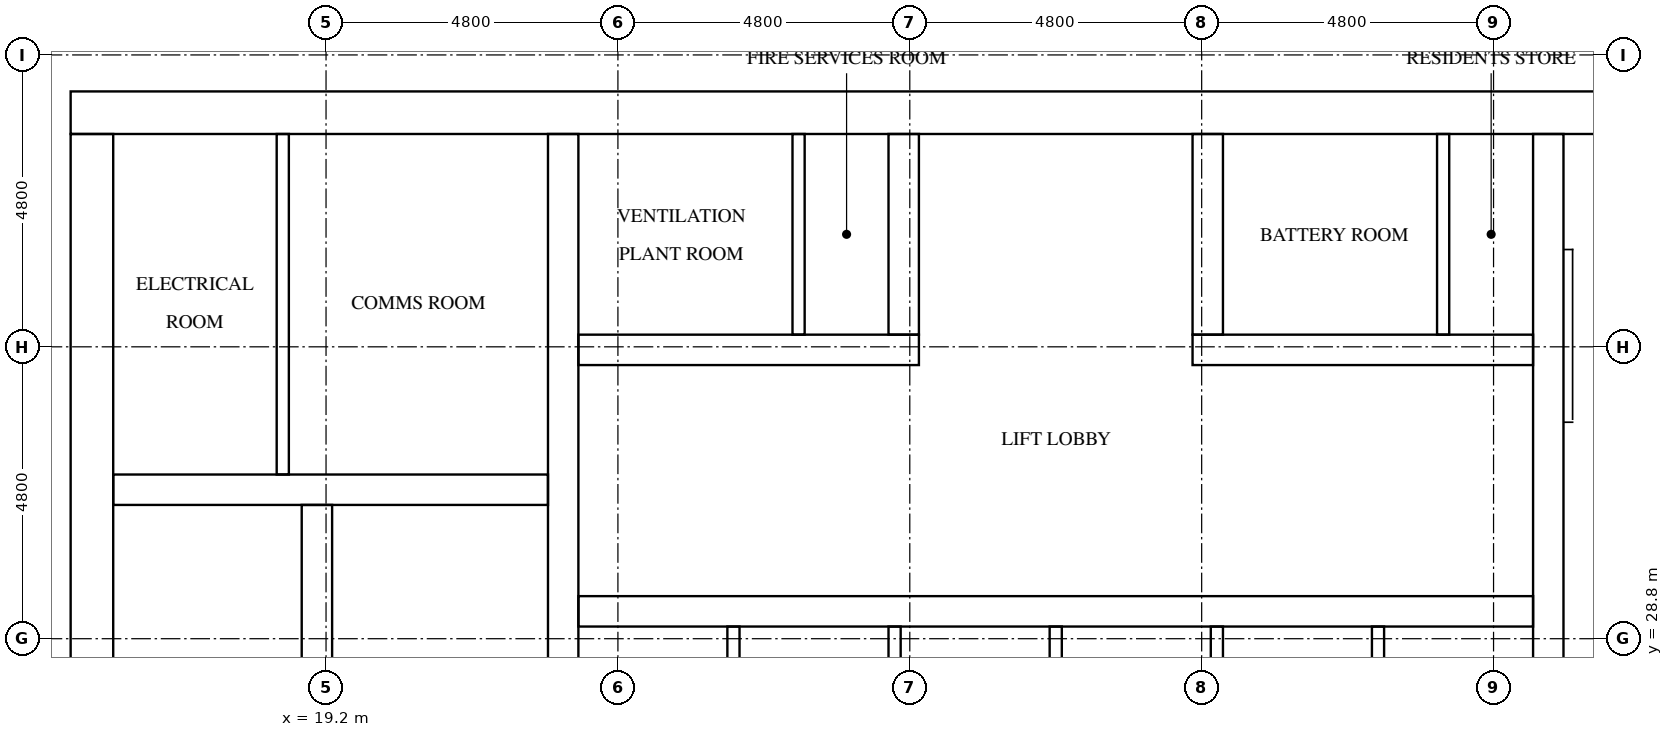
"""IFC4 building model, lengths in metres.
Left out: names, types, materials, properties, quantities, classifications, styles, units other than length and angle.
Written with IfcOpenShell. Run it as: python <this file> out.ifc"""

import sys

from ifc_helpers import new_model, si_unit, direction, frame, frame_2d, origin, place, context, subcontext, project, spatial, rectangle, extrude, element, fill, save


model = new_model("IFC4")
c1 = context("Model", 3, precision=1e-05, world=origin(), true_north=direction((0.0, 1.0)))
c2 = subcontext(c1, "Body", "Model", "MODEL_VIEW")
j1 = project(units=[si_unit("LENGTHUNIT", "METRE"), si_unit("PLANEANGLEUNIT", "RADIAN")], contexts=[c1])
p1 = place(None, origin())
s1 = spatial("IfcSite", under=j1, at=p1, CompositionType="ELEMENT")
p2 = place(p1, origin())
s2 = spatial("IfcBuilding", under=s1, at=p2, CompositionType="ELEMENT")
p3 = place(p2, frame((0.0, 0.0, 182.4)))
s3 = spatial("IfcBuildingStorey", under=s2, at=p3, CompositionType="ELEMENT", Elevation=182.4)
p4 = place(p3, frame((15.0, 37.45, 0.0), z_axis=(0.0, 0.0, 1.0), x_axis=(1.0, 0.0, 0.0)))
e1 = element("IfcWall", 1, at=p4, inside=s3, PredefinedType="SHEAR", context=c2, shape_type="SweptSolid", body=[
    extrude(rectangle(XDim=32.4, YDim=0.7, at=frame_2d((16.2, 0.0))), origin(), (0.0, 0.0, 1.0), 3.2),
])
p5 = place(p4, frame((15.3, 0.0, 0.0)))
e2 = element("IfcOpeningElement", 2, at=p5, cuts=e1, PredefinedType="OPENING", context=c2, shape_type="SweptSolid", body=[
    extrude(rectangle(XDim=1.8, YDim=2.1, at=frame_2d((0.9, 1.05))), frame((0.0, 0.36, 0.0), z_axis=(0.0, -1.0, 0.0), x_axis=(1.0, 0.0, 0.0)), (0.0, 0.0, 1.0), 0.72),
])
p6 = place(p4, frame((1.544, 0.0, 0.0)))
e3 = element("IfcOpeningElement", 3, at=p6, cuts=e1, PredefinedType="OPENING", context=c2, shape_type="SweptSolid", body=[
    extrude(rectangle(XDim=1.0, YDim=2.1, at=frame_2d((0.5, 1.05))), frame((0.0, 0.36, 0.0), z_axis=(0.0, -1.0, 0.0), x_axis=(1.0, 0.0, 0.0)), (0.0, 0.0, 1.0), 0.72),
])
p7 = place(p4, frame((5.219, 0.0, 0.0)))
e4 = element("IfcOpeningElement", 4, at=p7, cuts=e1, PredefinedType="OPENING", context=c2, shape_type="SweptSolid", body=[
    extrude(rectangle(XDim=1.0, YDim=2.1, at=frame_2d((0.5, 1.05))), frame((0.0, 0.36, 0.0), z_axis=(0.0, -1.0, 0.0), x_axis=(1.0, 0.0, 0.0)), (0.0, 0.0, 1.0), 0.72),
])
p8 = place(p3, frame((15.35, 15.7, 0.0), z_axis=(0.0, 0.0, 1.0), x_axis=(0.0, 1.0, 0.0)))
e5 = element("IfcWall", 5, at=p8, inside=s3, PredefinedType="SHEAR", context=c2, shape_type="SweptSolid", body=[
    extrude(rectangle(XDim=21.4, YDim=0.7, at=frame_2d((10.7, 0.0))), origin(), (0.0, 0.0, 1.0), 3.2),
])
p9 = place(p8, frame((5.06, 0.0, 0.0)))
e6 = element("IfcOpeningElement", 6, at=p9, cuts=e5, PredefinedType="OPENING", context=c2, shape_type="SweptSolid", body=[
    extrude(rectangle(XDim=1.2, YDim=2.1, at=frame_2d((0.6, 1.05))), frame((0.0, 0.36, 0.0), z_axis=(0.0, -1.0, 0.0), x_axis=(1.0, 0.0, 0.0)), (0.0, 0.0, 1.0), 0.72),
])
p10 = place(p3, frame((19.05, 15.7, 0.0), z_axis=(0.0, 0.0, 1.0), x_axis=(0.0, 1.0, 0.0)))
e7 = element("IfcWall", 7, at=p10, inside=s3, PredefinedType="SHEAR", context=c2, shape_type="SweptSolid", body=[
    extrude(rectangle(XDim=15.3, YDim=0.5, at=frame_2d((7.65, 0.0))), origin(), (0.0, 0.0, 1.0), 3.2),
])
p11 = place(p10, frame((9.75, 0.0, 0.0)))
e8 = element("IfcOpeningElement", 8, at=p11, cuts=e7, PredefinedType="OPENING", context=c2, shape_type="SweptSolid", body=[
    extrude(rectangle(XDim=1.1, YDim=2.1, at=frame_2d((0.55, 1.05))), frame((0.0, 0.26, 0.0), z_axis=(0.0, -1.0, 0.0), x_axis=(1.0, 0.0, 0.0)), (0.0, 0.0, 1.0), 0.52),
])
p12 = place(p10, frame((13.25, 0.0, 0.0)))
e9 = element("IfcOpeningElement", 9, at=p12, cuts=e7, PredefinedType="OPENING", context=c2, shape_type="SweptSolid", body=[
    extrude(rectangle(XDim=1.1, YDim=2.1, at=frame_2d((0.55, 1.05))), frame((0.0, 0.26, 0.0), z_axis=(0.0, -1.0, 0.0), x_axis=(1.0, 0.0, 0.0)), (0.0, 0.0, 1.0), 0.52),
])
p13 = place(p10, frame((0.5, 0.0, 0.0)))
e10 = element("IfcOpeningElement", 10, at=p13, cuts=e7, PredefinedType="OPENING", context=c2, shape_type="SweptSolid", body=[
    extrude(rectangle(XDim=1.2, YDim=2.1, at=frame_2d((0.6, 1.05))), frame((0.0, 0.26, 0.0), z_axis=(0.0, -1.0, 0.0), x_axis=(1.0, 0.0, 0.0)), (0.0, 0.0, 1.0), 0.52),
])
p14 = place(p3, frame((23.1, 15.7, 0.0), z_axis=(0.0, 0.0, 1.0), x_axis=(0.0, 1.0, 0.0)))
e11 = element("IfcWall", 11, at=p14, inside=s3, PredefinedType="SHEAR", context=c2, shape_type="SweptSolid", body=[
    extrude(rectangle(XDim=21.4, YDim=0.5, at=frame_2d((10.7, 0.0))), origin(), (0.0, 0.0, 1.0), 3.2),
])
p15 = place(p3, frame((39.3, 27.75, 0.0), z_axis=(0.0, 0.0, 1.0), x_axis=(0.0, 1.0, 0.0)))
e12 = element("IfcWall", 12, at=p15, inside=s3, PredefinedType="SHEAR", context=c2, shape_type="SweptSolid", body=[
    extrude(rectangle(XDim=9.35, YDim=0.5, at=frame_2d((4.675, 0.0))), origin(), (0.0, 0.0, 1.0), 3.2),
])
p16 = place(p3, frame((15.7, 31.25, 0.0), z_axis=(0.0, 0.0, 1.0), x_axis=(1.0, 0.0, 0.0)))
e13 = element("IfcWall", 13, at=p16, inside=s3, PredefinedType="SHEAR", context=c2, shape_type="SweptSolid", body=[
    extrude(rectangle(XDim=7.15, YDim=0.5, at=frame_2d((3.575, 0.0))), origin(), (0.0, 0.0, 1.0), 3.2),
])
p17 = place(p3, frame((23.35, 29.25, 0.0), z_axis=(0.0, 0.0, 1.0), x_axis=(1.0, 0.0, 0.0)))
e14 = element("IfcWall", 14, at=p17, inside=s3, PredefinedType="SHEAR", context=c2, shape_type="SweptSolid", body=[
    extrude(rectangle(XDim=15.7, YDim=0.5, at=frame_2d((7.85, 0.0))), origin(), (0.0, 0.0, 1.0), 3.2),
])
p18 = place(p17, frame((0.675, 0.0, 0.0)))
e15 = element("IfcOpeningElement", 15, at=p18, cuts=e14, PredefinedType="OPENING", context=c2, shape_type="SweptSolid", body=[
    extrude(rectangle(XDim=1.1, YDim=2.1, at=frame_2d((0.55, 1.05))), frame((0.0, 0.26, 0.0), z_axis=(0.0, -1.0, 0.0), x_axis=(1.0, 0.0, 0.0)), (0.0, 0.0, 1.0), 0.52),
])
p19 = place(p17, frame((3.325, 0.0, 0.0)))
e16 = element("IfcOpeningElement", 16, at=p19, cuts=e14, PredefinedType="OPENING", context=c2, shape_type="SweptSolid", body=[
    extrude(rectangle(XDim=1.1, YDim=2.1, at=frame_2d((0.55, 1.05))), frame((0.0, 0.26, 0.0), z_axis=(0.0, -1.0, 0.0), x_axis=(1.0, 0.0, 0.0)), (0.0, 0.0, 1.0), 0.52),
])
p20 = place(p17, frame((5.975, 0.0, 0.0)))
e17 = element("IfcOpeningElement", 17, at=p20, cuts=e14, PredefinedType="OPENING", context=c2, shape_type="SweptSolid", body=[
    extrude(rectangle(XDim=1.1, YDim=2.1, at=frame_2d((0.55, 1.05))), frame((0.0, 0.26, 0.0), z_axis=(0.0, -1.0, 0.0), x_axis=(1.0, 0.0, 0.0)), (0.0, 0.0, 1.0), 0.52),
])
p21 = place(p17, frame((8.625, 0.0, 0.0)))
e18 = element("IfcOpeningElement", 18, at=p21, cuts=e14, PredefinedType="OPENING", context=c2, shape_type="SweptSolid", body=[
    extrude(rectangle(XDim=1.1, YDim=2.1, at=frame_2d((0.55, 1.05))), frame((0.0, 0.26, 0.0), z_axis=(0.0, -1.0, 0.0), x_axis=(1.0, 0.0, 0.0)), (0.0, 0.0, 1.0), 0.52),
])
p22 = place(p17, frame((11.275, 0.0, 0.0)))
e19 = element("IfcOpeningElement", 19, at=p22, cuts=e14, PredefinedType="OPENING", context=c2, shape_type="SweptSolid", body=[
    extrude(rectangle(XDim=1.1, YDim=2.1, at=frame_2d((0.55, 1.05))), frame((0.0, 0.26, 0.0), z_axis=(0.0, -1.0, 0.0), x_axis=(1.0, 0.0, 0.0)), (0.0, 0.0, 1.0), 0.52),
])
p23 = place(p17, frame((13.925, 0.0, 0.0)))
e20 = element("IfcOpeningElement", 20, at=p23, cuts=e14, PredefinedType="OPENING", context=c2, shape_type="SweptSolid", body=[
    extrude(rectangle(XDim=1.1, YDim=2.1, at=frame_2d((0.55, 1.05))), frame((0.0, 0.26, 0.0), z_axis=(0.0, -1.0, 0.0), x_axis=(1.0, 0.0, 0.0)), (0.0, 0.0, 1.0), 0.52),
])
p24 = place(p3, frame((23.35, 33.55, 0.0), z_axis=(0.0, 0.0, 1.0), x_axis=(1.0, 0.0, 0.0)))
e21 = element("IfcWall", 21, at=p24, inside=s3, PredefinedType="SHEAR", context=c2, shape_type="SweptSolid", body=[
    extrude(rectangle(XDim=5.6, YDim=0.5, at=frame_2d((2.8, 0.0))), origin(), (0.0, 0.0, 1.0), 3.2),
])
p25 = place(p24, frame((1.26, 0.0, 0.0)))
e22 = element("IfcOpeningElement", 22, at=p25, cuts=e21, PredefinedType="OPENING", context=c2, shape_type="SweptSolid", body=[
    extrude(rectangle(XDim=1.0, YDim=2.1, at=frame_2d((0.5, 1.05))), frame((0.0, 0.26, 0.0), z_axis=(0.0, -1.0, 0.0), x_axis=(1.0, 0.0, 0.0)), (0.0, 0.0, 1.0), 0.52),
])
p26 = place(p24, frame((3.91, 0.0, 0.0)))
e23 = element("IfcOpeningElement", 23, at=p26, cuts=e21, PredefinedType="OPENING", context=c2, shape_type="SweptSolid", body=[
    extrude(rectangle(XDim=1.0, YDim=2.1, at=frame_2d((0.5, 1.05))), frame((0.0, 0.26, 0.0), z_axis=(0.0, -1.0, 0.0), x_axis=(1.0, 0.0, 0.0)), (0.0, 0.0, 1.0), 0.52),
])
p27 = place(p3, frame((33.45, 33.55, 0.0), z_axis=(0.0, 0.0, 1.0), x_axis=(1.0, 0.0, 0.0)))
e24 = element("IfcWall", 24, at=p27, inside=s3, PredefinedType="SHEAR", context=c2, shape_type="SweptSolid", body=[
    extrude(rectangle(XDim=5.6, YDim=0.5, at=frame_2d((2.8, 0.0))), origin(), (0.0, 0.0, 1.0), 3.2),
])
p28 = place(p27, frame((1.76, 0.0, 0.0)))
e25 = element("IfcOpeningElement", 25, at=p28, cuts=e24, PredefinedType="OPENING", context=c2, shape_type="SweptSolid", body=[
    extrude(rectangle(XDim=1.0, YDim=2.1, at=frame_2d((0.5, 1.05))), frame((0.0, 0.26, 0.0), z_axis=(0.0, -1.0, 0.0), x_axis=(1.0, 0.0, 0.0)), (0.0, 0.0, 1.0), 0.52),
])
p29 = place(p27, frame((4.41, 0.0, 0.0)))
e26 = element("IfcOpeningElement", 26, at=p29, cuts=e24, PredefinedType="OPENING", context=c2, shape_type="SweptSolid", body=[
    extrude(rectangle(XDim=1.0, YDim=2.1, at=frame_2d((0.5, 1.05))), frame((0.0, 0.26, 0.0), z_axis=(0.0, -1.0, 0.0), x_axis=(1.0, 0.0, 0.0)), (0.0, 0.0, 1.0), 0.52),
])
for number, where, z_axis, x_axis in (
    (27, (28.7, 33.8, 0.0), (0.0, 0.0, 1.0), (0.0, 1.0, 0.0)),
    (28, (33.7, 33.8, 0.0), (0.0, 0.0, 1.0), (0.0, 1.0, 0.0)),
):
    element("IfcWall", number, at=place(p3, frame(where, z_axis=z_axis, x_axis=x_axis)), inside=s3, PredefinedType="SHEAR", context=c2, shape_type="SweptSolid", body=[
        extrude(rectangle(XDim=3.3, YDim=0.5, at=frame_2d((1.65, 0.0))), origin(), (0.0, 0.0, 1.0), 3.2),
    ])
for number, where, z_axis, x_axis in (
    (29, (25.9, 26.4, 0.0), (0.0, 0.0, 1.0), (0.0, 1.0, 0.0)),
    (30, (28.55, 26.4, 0.0), (0.0, 0.0, 1.0), (0.0, 1.0, 0.0)),
    (31, (31.2, 26.4, 0.0), (0.0, 0.0, 1.0), (0.0, 1.0, 0.0)),
    (32, (33.85, 26.4, 0.0), (0.0, 0.0, 1.0), (0.0, 1.0, 0.0)),
    (33, (36.5, 26.4, 0.0), (0.0, 0.0, 1.0), (0.0, 1.0, 0.0)),
):
    element("IfcWall", number, at=place(p3, frame(where, z_axis=z_axis, x_axis=x_axis)), inside=s3, PredefinedType="SOLIDWALL", context=c2, shape_type="SweptSolid", body=[
        extrude(rectangle(XDim=2.6, YDim=0.2, at=frame_2d((1.3, 0.0))), origin(), (0.0, 0.0, 1.0), 3.2),
    ])
p30 = place(p3, frame((18.489, 31.5, 0.0), z_axis=(0.0, 0.0, 1.0), x_axis=(0.0, 1.0, 0.0)))
e34 = element("IfcWall", 34, at=p30, inside=s3, PredefinedType="PARTITIONING", context=c2, shape_type="SweptSolid", body=[
    extrude(rectangle(XDim=5.6, YDim=0.2, at=frame_2d((2.8, 0.0))), origin(), (0.0, 0.0, 1.0), 3.2),
])
for number, where, z_axis, x_axis in (
    (35, (26.971, 33.8, 0.0), (0.0, 0.0, 1.0), (0.0, 1.0, 0.0)),
    (36, (37.571, 33.8, 0.0), (0.0, 0.0, 1.0), (0.0, 1.0, 0.0)),
):
    element("IfcWall", number, at=place(p3, frame(where, z_axis=z_axis, x_axis=x_axis)), inside=s3, PredefinedType="PARTITIONING", context=c2, shape_type="SweptSolid", body=[
        extrude(rectangle(XDim=3.3, YDim=0.2, at=frame_2d((1.65, 0.0))), origin(), (0.0, 0.0, 1.0), 3.2),
    ])
p31 = place(p18, origin())
e37 = element("IfcDoor", 37, at=p31, inside=s3, OperationType="DOUBLE_DOOR_SLIDING", PredefinedType="DOOR", context=c2, shape_type="SweptSolid", body=[
    extrude(rectangle(XDim=1.1, YDim=2.1, at=frame_2d((0.55, 1.05))), frame((0.0, 0.025, 0.0), z_axis=(0.0, -1.0, 0.0), x_axis=(1.0, 0.0, 0.0)), (0.0, 0.0, 1.0), 0.05),
])
fill(e15, e37)
p32 = place(p19, origin())
e38 = element("IfcDoor", 38, at=p32, inside=s3, OperationType="DOUBLE_DOOR_SLIDING", PredefinedType="DOOR", context=c2, shape_type="SweptSolid", body=[
    extrude(rectangle(XDim=1.1, YDim=2.1, at=frame_2d((0.55, 1.05))), frame((0.0, 0.025, 0.0), z_axis=(0.0, -1.0, 0.0), x_axis=(1.0, 0.0, 0.0)), (0.0, 0.0, 1.0), 0.05),
])
fill(e16, e38)
p33 = place(p20, origin())
e39 = element("IfcDoor", 39, at=p33, inside=s3, OperationType="DOUBLE_DOOR_SLIDING", PredefinedType="DOOR", context=c2, shape_type="SweptSolid", body=[
    extrude(rectangle(XDim=1.1, YDim=2.1, at=frame_2d((0.55, 1.05))), frame((0.0, 0.025, 0.0), z_axis=(0.0, -1.0, 0.0), x_axis=(1.0, 0.0, 0.0)), (0.0, 0.0, 1.0), 0.05),
])
fill(e17, e39)
p34 = place(p21, origin())
e40 = element("IfcDoor", 40, at=p34, inside=s3, OperationType="DOUBLE_DOOR_SLIDING", PredefinedType="DOOR", context=c2, shape_type="SweptSolid", body=[
    extrude(rectangle(XDim=1.1, YDim=2.1, at=frame_2d((0.55, 1.05))), frame((0.0, 0.025, 0.0), z_axis=(0.0, -1.0, 0.0), x_axis=(1.0, 0.0, 0.0)), (0.0, 0.0, 1.0), 0.05),
])
fill(e18, e40)
p35 = place(p22, origin())
e41 = element("IfcDoor", 41, at=p35, inside=s3, OperationType="DOUBLE_DOOR_SLIDING", PredefinedType="DOOR", context=c2, shape_type="SweptSolid", body=[
    extrude(rectangle(XDim=1.1, YDim=2.1, at=frame_2d((0.55, 1.05))), frame((0.0, 0.025, 0.0), z_axis=(0.0, -1.0, 0.0), x_axis=(1.0, 0.0, 0.0)), (0.0, 0.0, 1.0), 0.05),
])
fill(e19, e41)
p36 = place(p23, origin())
e42 = element("IfcDoor", 42, at=p36, inside=s3, OperationType="DOUBLE_DOOR_SLIDING", PredefinedType="DOOR", context=c2, shape_type="SweptSolid", body=[
    extrude(rectangle(XDim=1.1, YDim=2.1, at=frame_2d((0.55, 1.05))), frame((0.0, 0.025, 0.0), z_axis=(0.0, -1.0, 0.0), x_axis=(1.0, 0.0, 0.0)), (0.0, 0.0, 1.0), 0.05),
])
fill(e20, e42)
p37 = place(p12, origin())
e43 = element("IfcDoor", 43, at=p37, inside=s3, OperationType="DOUBLE_DOOR_SLIDING", PredefinedType="DOOR", context=c2, shape_type="SweptSolid", body=[
    extrude(rectangle(XDim=1.1, YDim=2.1, at=frame_2d((0.55, 1.05))), frame((0.0, 0.025, 0.0), z_axis=(0.0, -1.0, 0.0), x_axis=(1.0, 0.0, 0.0)), (0.0, 0.0, 1.0), 0.05),
])
fill(e9, e43)
p38 = place(p5, origin())
e44 = element("IfcDoor", 44, at=p38, inside=s3, OperationType="DOUBLE_DOOR_SINGLE_SWING", PredefinedType="DOOR", context=c2, shape_type="SweptSolid", body=[
    extrude(rectangle(XDim=1.8, YDim=2.1, at=frame_2d((0.9, 1.05))), frame((0.0, 0.025, 0.0), z_axis=(0.0, -1.0, 0.0), x_axis=(1.0, 0.0, 0.0)), (0.0, 0.0, 1.0), 0.05),
])
fill(e2, e44)
p39 = place(p6, origin())
e45 = element("IfcDoor", 45, at=p39, inside=s3, OperationType="SINGLE_SWING_RIGHT", PredefinedType="DOOR", context=c2, shape_type="SweptSolid", body=[
    extrude(rectangle(XDim=1.0, YDim=2.1, at=frame_2d((0.5, 1.05))), frame((0.0, 0.025, 0.0), z_axis=(0.0, -1.0, 0.0), x_axis=(1.0, 0.0, 0.0)), (0.0, 0.0, 1.0), 0.05),
])
fill(e3, e45)
p40 = place(p7, origin())
e46 = element("IfcDoor", 46, at=p40, inside=s3, OperationType="SINGLE_SWING_LEFT", PredefinedType="DOOR", context=c2, shape_type="SweptSolid", body=[
    extrude(rectangle(XDim=1.0, YDim=2.1, at=frame_2d((0.5, 1.05))), frame((0.0, 0.025, 0.0), z_axis=(0.0, -1.0, 0.0), x_axis=(1.0, 0.0, 0.0)), (0.0, 0.0, 1.0), 0.05),
])
fill(e4, e46)
p41 = place(p25, frame((1.0, 0.0, 0.0), z_axis=(0.0, 0.0, 1.0), x_axis=(-1.0, 0.0, 0.0)))
e47 = element("IfcDoor", 47, at=p41, inside=s3, OperationType="SINGLE_SWING_LEFT", PredefinedType="DOOR", context=c2, shape_type="SweptSolid", body=[
    extrude(rectangle(XDim=1.0, YDim=2.1, at=frame_2d((0.5, 1.05))), frame((0.0, 0.025, 0.0), z_axis=(0.0, -1.0, 0.0), x_axis=(1.0, 0.0, 0.0)), (0.0, 0.0, 1.0), 0.05),
])
fill(e22, e47)
p42 = place(p26, frame((1.0, 0.0, 0.0), z_axis=(0.0, 0.0, 1.0), x_axis=(-1.0, 0.0, 0.0)))
e48 = element("IfcDoor", 48, at=p42, inside=s3, OperationType="SINGLE_SWING_RIGHT", PredefinedType="DOOR", context=c2, shape_type="SweptSolid", body=[
    extrude(rectangle(XDim=1.0, YDim=2.1, at=frame_2d((0.5, 1.05))), frame((0.0, 0.025, 0.0), z_axis=(0.0, -1.0, 0.0), x_axis=(1.0, 0.0, 0.0)), (0.0, 0.0, 1.0), 0.05),
])
fill(e23, e48)
p43 = place(p28, frame((1.0, 0.0, 0.0), z_axis=(0.0, 0.0, 1.0), x_axis=(-1.0, 0.0, 0.0)))
e49 = element("IfcDoor", 49, at=p43, inside=s3, OperationType="SINGLE_SWING_LEFT", PredefinedType="DOOR", context=c2, shape_type="SweptSolid", body=[
    extrude(rectangle(XDim=1.0, YDim=2.1, at=frame_2d((0.5, 1.05))), frame((0.0, 0.025, 0.0), z_axis=(0.0, -1.0, 0.0), x_axis=(1.0, 0.0, 0.0)), (0.0, 0.0, 1.0), 0.05),
])
fill(e25, e49)
p44 = place(p29, frame((1.0, 0.0, 0.0), z_axis=(0.0, 0.0, 1.0), x_axis=(-1.0, 0.0, 0.0)))
e50 = element("IfcDoor", 50, at=p44, inside=s3, OperationType="SINGLE_SWING_RIGHT", PredefinedType="DOOR", context=c2, shape_type="SweptSolid", body=[
    extrude(rectangle(XDim=1.0, YDim=2.1, at=frame_2d((0.5, 1.05))), frame((0.0, 0.025, 0.0), z_axis=(0.0, -1.0, 0.0), x_axis=(1.0, 0.0, 0.0)), (0.0, 0.0, 1.0), 0.05),
])
fill(e26, e50)
save(model, sys.argv[1])
